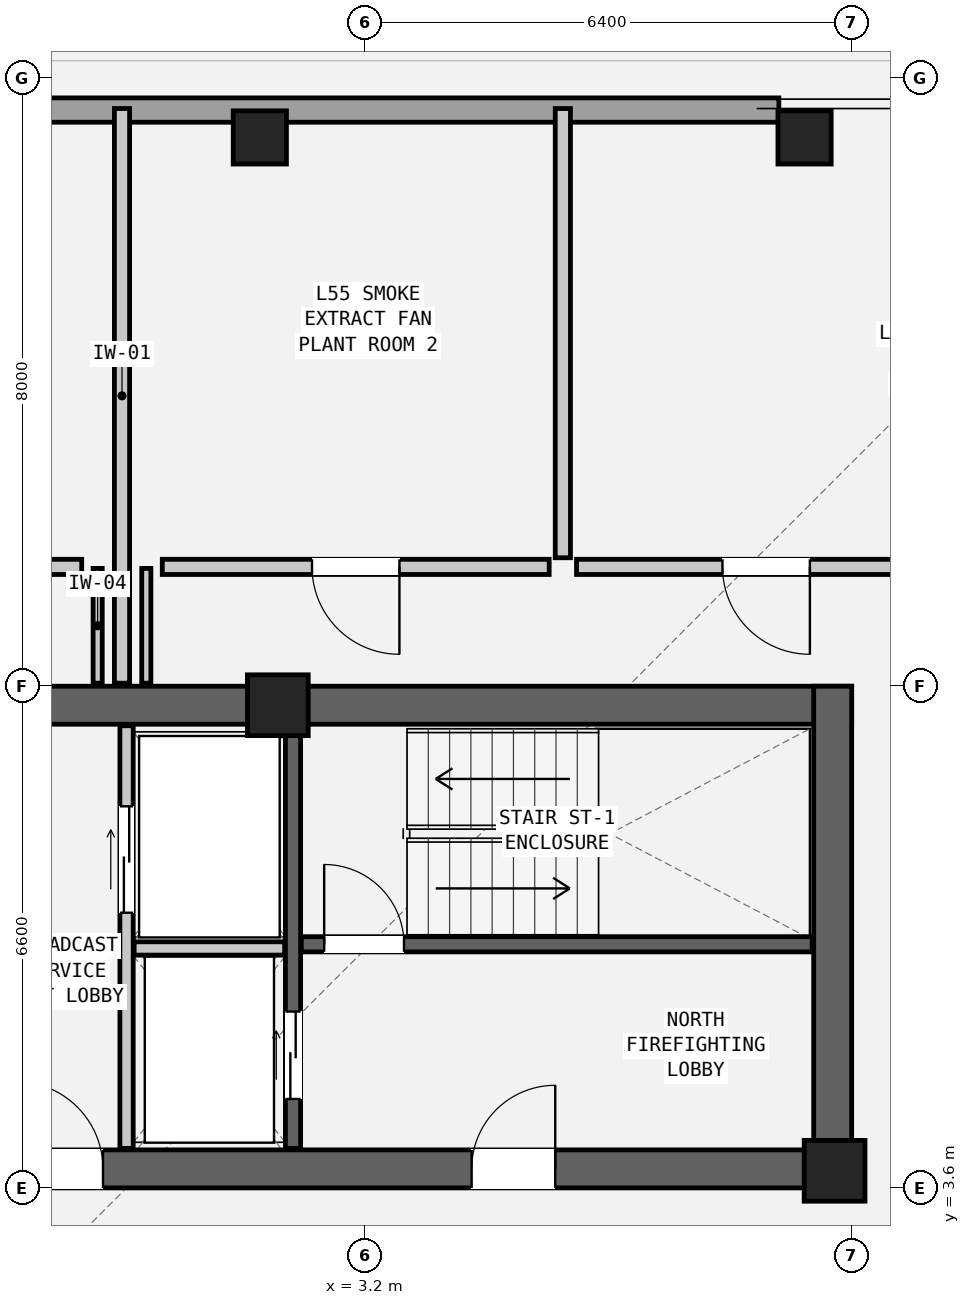
"""IFC4 building model, lengths in metres.
Left out: names, types, materials, properties, quantities, classifications, styles, units other than length and angle.
Written with IfcOpenShell. Run it as: python <this file> out.ifc"""

import sys

from ifc_helpers import new_model, si_unit, direction, frame, frame_2d, origin, origin_2d, place, context, subcontext, project, spatial, rectangle, hollow_rectangle, extrude, element, fill, save


model = new_model("IFC4")
c1 = context("Model", 3, precision=1e-05, world=origin(), true_north=direction((0.0, 1.0)))
c2 = subcontext(c1, "Body", "Model", "MODEL_VIEW")
j1 = project(units=[si_unit("LENGTHUNIT", "METRE"), si_unit("PLANEANGLEUNIT", "RADIAN")], contexts=[c1])
p1 = place(None, origin())
s1 = spatial("IfcSite", under=j1, at=p1, CompositionType="ELEMENT")
p2 = place(p1, origin())
s2 = spatial("IfcBuilding", under=s1, at=p2, CompositionType="ELEMENT")
p3 = place(p2, frame((0.0, 0.0, 187.95)))
s3 = spatial("IfcBuildingStorey", under=s2, at=p3, CompositionType="ELEMENT", Elevation=187.95)
p4 = place(p3, frame((-9.6, 9.95, 0.0), z_axis=(0.0, 0.0, 1.0), x_axis=(1.0, 0.0, 0.0)))
e1 = element("IfcWall", 1, at=p4, inside=s3, PredefinedType="SHEAR", context=c2, shape_type="SweptSolid", body=[
    extrude(rectangle(XDim=19.2, YDim=0.5, at=frame_2d((9.6, 0.0))), origin(), (0.0, 0.0, 1.0), 3.6),
])
p5 = place(p3, frame((-9.6, 3.85, 0.0), z_axis=(0.0, 0.0, 1.0), x_axis=(1.0, 0.0, 0.0)))
e2 = element("IfcWall", 2, at=p5, inside=s3, PredefinedType="SHEAR", context=c2, shape_type="SweptSolid", body=[
    extrude(rectangle(XDim=19.2, YDim=0.5, at=frame_2d((9.6, 0.0))), origin(), (0.0, 0.0, 1.0), 3.6),
])
p6 = place(p5, frame((14.2, 0.0, 0.0)))
e3 = element("IfcOpeningElement", 3, at=p6, cuts=e2, PredefinedType="OPENING", context=c2, shape_type="SweptSolid", body=[
    extrude(rectangle(XDim=1.1, YDim=2.08, at=frame_2d((0.55, 1.04))), frame((0.0, 0.262, 0.0), z_axis=(0.0, -1.0, 0.0), x_axis=(1.0, 0.0, 0.0)), (0.0, 0.0, 1.0), 0.524),
])
p7 = place(p5, frame((8.2, 0.0, 0.0)))
e4 = element("IfcOpeningElement", 4, at=p7, cuts=e2, PredefinedType="OPENING", context=c2, shape_type="SweptSolid", body=[
    extrude(rectangle(XDim=1.15, YDim=2.1, at=frame_2d((0.575, 1.05))), frame((0.0, 0.262, 0.0), z_axis=(0.0, -1.0, 0.0), x_axis=(1.0, 0.0, 0.0)), (0.0, 0.0, 1.0), 0.524),
])
p8 = place(p5, frame((2.5, 0.0, 0.0)))
e5 = element("IfcOpeningElement", 5, at=p8, cuts=e2, PredefinedType="OPENING", context=c2, shape_type="SweptSolid", body=[
    extrude(rectangle(XDim=1.2, YDim=2.1, at=frame_2d((0.6, 1.05))), frame((0.0, 0.262, 0.0), z_axis=(0.0, -1.0, 0.0), x_axis=(1.0, 0.0, 0.0)), (0.0, 0.0, 1.0), 0.524),
])
p9 = place(p3, frame((9.35, 3.6, 0.0), z_axis=(0.0, 0.0, 1.0), x_axis=(0.0, 1.0, 0.0)))
e6 = element("IfcWall", 6, at=p9, inside=s3, PredefinedType="SHEAR", context=c2, shape_type="SweptSolid", body=[
    extrude(rectangle(XDim=6.6, YDim=0.5, at=frame_2d((3.3, 0.0))), origin(), (0.0, 0.0, 1.0), 3.6),
])
for number, where, z_axis, x_axis in (
    (7, (8.98, 17.42, 0.0), (0.0, 0.0, 1.0), (1.0, 0.0, 0.0)),
    (8, (1.813, 17.42, 0.0), (0.0, 0.0, 1.0), (1.0, 0.0, 0.0)),
):
    element("IfcColumn", number, at=place(p3, frame(where, z_axis=z_axis, x_axis=x_axis)), inside=s3, PredefinedType="COLUMN", context=c2, shape_type="SweptSolid", body=[
        extrude(hollow_rectangle(XDim=0.7, YDim=0.7, WallThickness=0.045, at=origin_2d()), origin(), (0.0, 0.0, 1.0), 3.6),
    ])
for number, where, z_axis, x_axis in (
    (9, (2.05, 9.95, 0.0), (0.0, 0.0, 1.0), (1.0, 0.0, 0.0)),
    (10, (9.375, 3.825, 0.0), (0.0, 0.0, 1.0), (1.0, 0.0, 0.0)),
):
    element("IfcColumn", number, at=place(p3, frame(where, z_axis=z_axis, x_axis=x_axis)), inside=s3, PredefinedType="COLUMN", context=c2, shape_type="SweptSolid", body=[
        extrude(rectangle(XDim=0.8, YDim=0.8, at=origin_2d()), origin(), (0.0, 0.0, 1.0), 3.6),
    ])
p10 = place(p3, frame((-12.182, 17.78, 0.0), z_axis=(0.0, 0.0, 1.0), x_axis=(1.0, 0.0, 0.0)))
e11 = element("IfcWall", 11, at=p10, inside=s3, PredefinedType="SOLIDWALL", context=c2, shape_type="SweptSolid", body=[
    extrude(rectangle(XDim=20.824, YDim=0.32, at=frame_2d((10.412, 0.0))), origin(), (0.0, 0.0, 1.0), 2.182),
])
p11 = place(p3, frame((2.36, 6.805, 0.0), z_axis=(0.0, 0.0, 1.0), x_axis=(1.0, 0.0, 0.0)))
e12 = element("IfcWall", 12, at=p11, inside=s3, PredefinedType="SHEAR", context=c2, shape_type="SweptSolid", body=[
    extrude(rectangle(XDim=6.72, YDim=0.2, at=frame_2d((3.36, 0.0))), origin(), (0.0, 0.0, 1.0), 3.32),
])
p12 = place(p11, frame((0.3, 0.0, 0.0)))
e13 = element("IfcOpeningElement", 13, at=p12, cuts=e12, PredefinedType="OPENING", context=c2, shape_type="SweptSolid", body=[
    extrude(rectangle(XDim=1.05, YDim=2.08, at=frame_2d((0.525, 1.04))), frame((0.0, 0.112, 0.0), z_axis=(0.0, -1.0, 0.0), x_axis=(1.0, 0.0, 0.0)), (0.0, 0.0, 1.0), 0.224),
])
p13 = place(p3, frame((2.25, 4.12, 0.0), z_axis=(0.0, 0.0, 1.0), x_axis=(0.0, 1.0, 0.0)))
e14 = element("IfcWall", 14, at=p13, inside=s3, PredefinedType="SHEAR", context=c2, shape_type="SweptSolid", body=[
    extrude(rectangle(XDim=5.56, YDim=0.2, at=frame_2d((2.78, 0.0))), origin(), (0.0, 0.0, 1.0), 3.32),
])
p14 = place(p13, frame((0.65, 0.0, 0.0)))
e15 = element("IfcOpeningElement", 15, at=p14, cuts=e14, PredefinedType="OPENING", context=c2, shape_type="SweptSolid", body=[
    extrude(rectangle(XDim=1.15, YDim=2.08, at=frame_2d((0.575, 1.04))), frame((0.0, 0.112, 0.0), z_axis=(0.0, -1.0, 0.0), x_axis=(1.0, 0.0, 0.0)), (0.0, 0.0, 1.0), 0.224),
])
p15 = place(p3, frame((0.06, 4.12, 0.0), z_axis=(0.0, 0.0, 1.0), x_axis=(0.0, 1.0, 0.0)))
e16 = element("IfcWall", 16, at=p15, inside=s3, PredefinedType="PARTITIONING", context=c2, shape_type="SweptSolid", body=[
    extrude(rectangle(XDim=5.56, YDim=0.175, at=frame_2d((2.78, 0.0))), origin(), (0.0, 0.0, 1.0), 3.32),
])
p16 = place(p15, frame((3.1, 0.0, 0.0)))
e17 = element("IfcOpeningElement", 17, at=p16, cuts=e16, PredefinedType="OPENING", context=c2, shape_type="SweptSolid", body=[
    extrude(rectangle(XDim=1.4, YDim=2.12, at=frame_2d((0.7, 1.06))), frame((0.0, 0.1, 0.0), z_axis=(0.0, -1.0, 0.0), x_axis=(1.0, 0.0, 0.0)), (0.0, 0.0, 1.0), 0.199),
])
p17 = place(p3, frame((0.16, 6.75, 0.0), z_axis=(0.0, 0.0, 1.0), x_axis=(1.0, 0.0, 0.0)))
e18 = element("IfcWall", 18, at=p17, inside=s3, PredefinedType="PARTITIONING", context=c2, shape_type="SweptSolid", body=[
    extrude(rectangle(XDim=1.98, YDim=0.175, at=frame_2d((0.99, 0.0))), origin(), (0.0, 0.0, 1.0), 3.32),
])
p18 = place(p3, frame((0.0, 10.24, 0.0), z_axis=(0.0, 0.0, 1.0), x_axis=(0.0, 1.0, 0.0)))
e19 = element("IfcWall", 19, at=p18, inside=s3, PredefinedType="PARTITIONING", context=c2, shape_type="SweptSolid", body=[
    extrude(rectangle(XDim=7.56, YDim=0.2, at=frame_2d((3.78, 0.0))), origin(), (0.0, 0.0, 1.0), 2.538),
])
for number, where, z_axis, x_axis in (
    (20, (-0.32, 10.24, 0.0), (0.0, 0.0, 1.0), (0.0, 1.0, 0.0)),
    (21, (0.32, 10.24, 0.0), (0.0, 0.0, 1.0), (0.0, 1.0, 0.0)),
):
    element("IfcWall", number, at=place(p3, frame(where, z_axis=z_axis, x_axis=x_axis)), inside=s3, PredefinedType="PARTITIONING", context=c2, shape_type="SweptSolid", body=[
        extrude(rectangle(XDim=1.51, YDim=0.12, at=frame_2d((0.755, 0.0))), origin(), (0.0, 0.0, 1.0), 2.538),
    ])
p19 = place(p3, frame((-0.53, 11.77, 0.0), z_axis=(0.0, 0.0, 1.0), x_axis=(-1.0, 0.0, 0.0)))
e22 = element("IfcWall", 22, at=p19, inside=s3, PredefinedType="PARTITIONING", context=c2, shape_type="SweptSolid", body=[
    extrude(rectangle(XDim=5.09, YDim=0.2, at=frame_2d((2.545, 0.0))), origin(), (0.0, 0.0, 1.0), 3.32),
])
p20 = place(p19, frame((1.97, 0.0, 0.0)))
e23 = element("IfcOpeningElement", 23, at=p20, cuts=e22, PredefinedType="OPENING", context=c2, shape_type="SweptSolid", body=[
    extrude(rectangle(XDim=1.15, YDim=2.1, at=frame_2d((0.575, 1.05))), frame((0.0, 0.112, 0.0), z_axis=(0.0, -1.0, 0.0), x_axis=(1.0, 0.0, 0.0)), (0.0, 0.0, 1.0), 0.224),
])
p21 = place(p3, frame((5.62, 11.77, 0.0), z_axis=(0.0, 0.0, 1.0), x_axis=(-1.0, 0.0, 0.0)))
e24 = element("IfcWall", 24, at=p21, inside=s3, PredefinedType="PARTITIONING", context=c2, shape_type="SweptSolid", body=[
    extrude(rectangle(XDim=5.09, YDim=0.2, at=frame_2d((2.545, 0.0))), origin(), (0.0, 0.0, 1.0), 3.32),
])
p22 = place(p21, frame((1.97, 0.0, 0.0)))
e25 = element("IfcOpeningElement", 25, at=p22, cuts=e24, PredefinedType="OPENING", context=c2, shape_type="SweptSolid", body=[
    extrude(rectangle(XDim=1.15, YDim=2.1, at=frame_2d((0.575, 1.05))), frame((0.0, 0.112, 0.0), z_axis=(0.0, -1.0, 0.0), x_axis=(1.0, 0.0, 0.0)), (0.0, 0.0, 1.0), 0.224),
])
p23 = place(p3, frame((5.8, 11.89, 0.0), z_axis=(0.0, 0.0, 1.0), x_axis=(0.0, 1.0, 0.0)))
e26 = element("IfcWall", 26, at=p23, inside=s3, PredefinedType="PARTITIONING", context=c2, shape_type="SweptSolid", body=[
    extrude(rectangle(XDim=5.91, YDim=0.2, at=frame_2d((2.955, 0.0))), origin(), (0.0, 0.0, 1.0), 2.538),
])
p24 = place(p3, frame((10.97, 11.77, 0.0), z_axis=(0.0, 0.0, 1.0), x_axis=(-1.0, 0.0, 0.0)))
e27 = element("IfcWall", 27, at=p24, inside=s3, PredefinedType="PARTITIONING", context=c2, shape_type="SweptSolid", body=[
    extrude(rectangle(XDim=4.99, YDim=0.2, at=frame_2d((2.495, 0.0))), origin(), (0.0, 0.0, 1.0), 3.32),
])
p25 = place(p24, frame((1.92, 0.0, 0.0)))
e28 = element("IfcOpeningElement", 28, at=p25, cuts=e27, PredefinedType="OPENING", context=c2, shape_type="SweptSolid", body=[
    extrude(rectangle(XDim=1.15, YDim=2.1, at=frame_2d((0.575, 1.05))), frame((0.0, 0.112, 0.0), z_axis=(0.0, -1.0, 0.0), x_axis=(1.0, 0.0, 0.0)), (0.0, 0.0, 1.0), 0.224),
])
p26 = place(p12, origin())
e29 = element("IfcDoor", 29, at=p26, inside=s3, OperationType="SINGLE_SWING_LEFT", PredefinedType="DOOR", context=c2, shape_type="SweptSolid", body=[
    extrude(rectangle(XDim=1.05, YDim=2.08, at=frame_2d((0.525, 1.04))), frame((0.0, 0.025, 0.0), z_axis=(0.0, -1.0, 0.0), x_axis=(1.0, 0.0, 0.0)), (0.0, 0.0, 1.0), 0.05),
])
fill(e13, e29)
p27 = place(p6, origin())
e30 = element("IfcDoor", 30, at=p27, inside=s3, OperationType="SINGLE_SWING_RIGHT", PredefinedType="DOOR", context=c2, shape_type="SweptSolid", body=[
    extrude(rectangle(XDim=1.1, YDim=2.08, at=frame_2d((0.55, 1.04))), frame((0.0, 0.025, 0.0), z_axis=(0.0, -1.0, 0.0), x_axis=(1.0, 0.0, 0.0)), (0.0, 0.0, 1.0), 0.05),
])
fill(e3, e30)
p28 = place(p14, origin())
e31 = element("IfcDoor", 31, at=p28, inside=s3, OperationType="DOUBLE_DOOR_SLIDING", PredefinedType="DOOR", context=c2, shape_type="SweptSolid", body=[
    extrude(rectangle(XDim=1.15, YDim=2.08, at=frame_2d((0.575, 1.04))), frame((0.0, 0.025, 0.0), z_axis=(0.0, -1.0, 0.0), x_axis=(1.0, 0.0, 0.0)), (0.0, 0.0, 1.0), 0.05),
])
fill(e15, e31)
p29 = place(p16, origin())
e32 = element("IfcDoor", 32, at=p29, inside=s3, OperationType="DOUBLE_DOOR_SLIDING", PredefinedType="DOOR", context=c2, shape_type="SweptSolid", body=[
    extrude(rectangle(XDim=1.4, YDim=2.12, at=frame_2d((0.7, 1.06))), frame((0.0, 0.025, 0.0), z_axis=(0.0, -1.0, 0.0), x_axis=(1.0, 0.0, 0.0)), (0.0, 0.0, 1.0), 0.05),
])
fill(e17, e32)
p30 = place(p7, origin())
e33 = element("IfcDoor", 33, at=p30, inside=s3, OperationType="SINGLE_SWING_LEFT", PredefinedType="DOOR", context=c2, shape_type="SweptSolid", body=[
    extrude(rectangle(XDim=1.15, YDim=2.1, at=frame_2d((0.575, 1.05))), frame((0.0, 0.025, 0.0), z_axis=(0.0, -1.0, 0.0), x_axis=(1.0, 0.0, 0.0)), (0.0, 0.0, 1.0), 0.05),
])
fill(e4, e33)
p31 = place(p22, origin())
e34 = element("IfcDoor", 34, at=p31, inside=s3, OperationType="SINGLE_SWING_LEFT", PredefinedType="DOOR", context=c2, shape_type="SweptSolid", body=[
    extrude(rectangle(XDim=1.15, YDim=2.1, at=frame_2d((0.575, 1.05))), frame((0.0, 0.025, 0.0), z_axis=(0.0, -1.0, 0.0), x_axis=(1.0, 0.0, 0.0)), (0.0, 0.0, 1.0), 0.05),
])
fill(e25, e34)
p32 = place(p25, origin())
e35 = element("IfcDoor", 35, at=p32, inside=s3, OperationType="SINGLE_SWING_LEFT", PredefinedType="DOOR", context=c2, shape_type="SweptSolid", body=[
    extrude(rectangle(XDim=1.15, YDim=2.1, at=frame_2d((0.575, 1.05))), frame((0.0, 0.025, 0.0), z_axis=(0.0, -1.0, 0.0), x_axis=(1.0, 0.0, 0.0)), (0.0, 0.0, 1.0), 0.05),
])
fill(e28, e35)
save(model, sys.argv[1])
